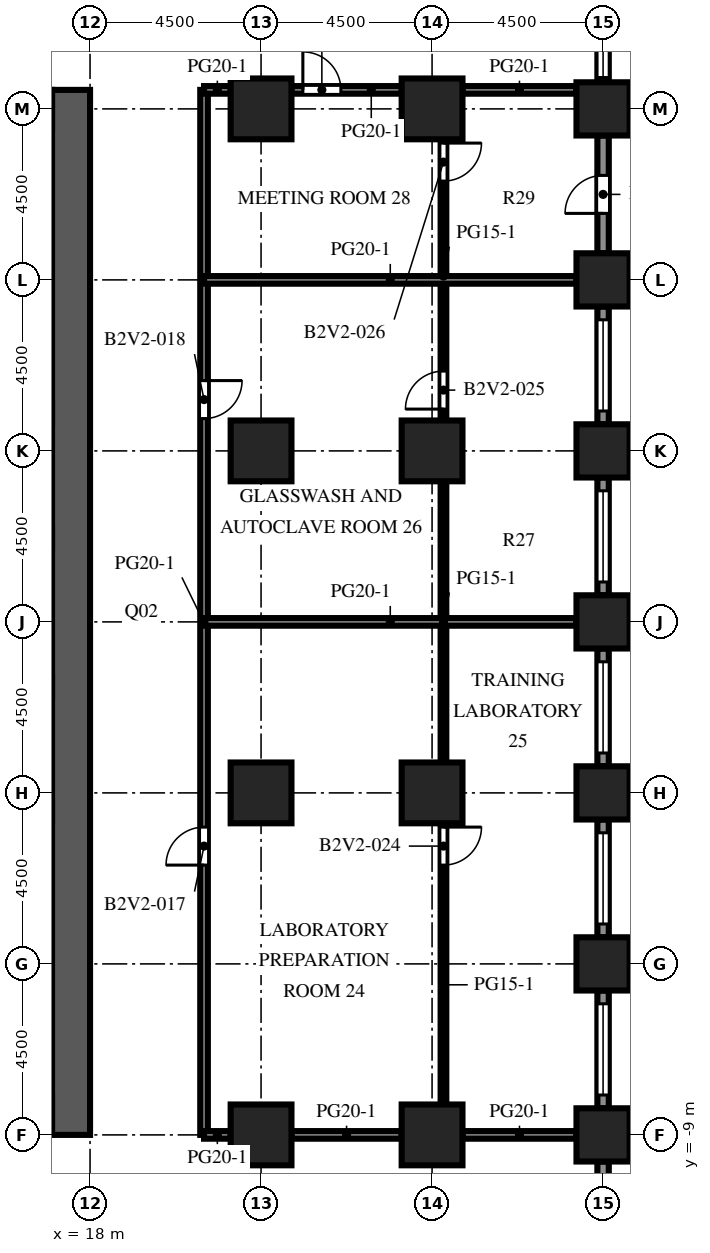
"""IFC4 building model, lengths in metres.
Left out: names, types, materials, properties, quantities, classifications, styles, units other than length and angle.
Written with IfcOpenShell. Run it as: python <this file> out.ifc"""

import sys

from ifc_helpers import new_model, si_unit, direction, frame, frame_2d, origin, origin_2d, place, context, subcontext, project, spatial, rectangle, extrude, element, fill, save


model = new_model("IFC4")
c1 = context("Model", 3, precision=1e-05, world=origin(), true_north=direction((0.0, 1.0)))
c2 = subcontext(c1, "Body", "Model", "MODEL_VIEW")
j1 = project(units=[si_unit("LENGTHUNIT", "METRE"), si_unit("PLANEANGLEUNIT", "RADIAN")], contexts=[c1])
p1 = place(None, origin())
s1 = spatial("IfcSite", under=j1, at=p1, CompositionType="ELEMENT")
p2 = place(p1, origin())
s2 = spatial("IfcBuilding", under=s1, at=p2, CompositionType="ELEMENT")
p3 = place(p2, frame((0.0, 0.0, 58.3)))
s3 = spatial("IfcBuildingStorey", under=s2, at=p3, CompositionType="ELEMENT", Elevation=58.3)
for number, where, z_axis, x_axis in (
    (1, (31.5, -9.0, 0.0), (0.0, 0.0, 1.0), (1.0, 0.0, 0.0)),
    (2, (31.5, -4.5, 0.0), (0.0, 0.0, 1.0), (1.0, 0.0, 0.0)),
    (3, (31.5, 0.0, 0.0), (0.0, 0.0, 1.0), (1.0, 0.0, 0.0)),
    (4, (31.5, 4.5, 0.0), (0.0, 0.0, 1.0), (1.0, 0.0, 0.0)),
    (5, (31.5, 9.0, 0.0), (0.0, 0.0, 1.0), (1.0, 0.0, 0.0)),
    (6, (31.5, 13.5, 0.0), (0.0, 0.0, 1.0), (1.0, 0.0, 0.0)),
    (7, (31.5, 18.0, 0.0), (0.0, 0.0, 1.0), (1.0, 0.0, 0.0)),
):
    element("IfcColumn", number, at=place(p3, frame(where, z_axis=z_axis, x_axis=x_axis)), inside=s3, PredefinedType="COLUMN", context=c2, shape_type="SweptSolid", body=[
        extrude(rectangle(XDim=1.4, YDim=1.4, at=origin_2d()), origin(), (0.0, 0.0, 1.0), 4.1),
    ])
for number, where, z_axis, x_axis in (
    (8, (22.5, -9.0, 0.0), (0.0, 0.0, 1.0), (1.0, 0.0, 0.0)),
    (9, (22.5, 0.0, 0.0), (0.0, 0.0, 1.0), (1.0, 0.0, 0.0)),
    (10, (22.5, 9.0, 0.0), (0.0, 0.0, 1.0), (1.0, 0.0, 0.0)),
    (11, (22.5, 18.0, 0.0), (0.0, 0.0, 1.0), (1.0, 0.0, 0.0)),
    (12, (27.0, -9.0, 0.0), (0.0, 0.0, 1.0), (1.0, 0.0, 0.0)),
    (13, (27.0, 0.0, 0.0), (0.0, 0.0, 1.0), (1.0, 0.0, 0.0)),
    (14, (27.0, 9.0, 0.0), (0.0, 0.0, 1.0), (1.0, 0.0, 0.0)),
    (15, (27.0, 18.0, 0.0), (0.0, 0.0, 1.0), (1.0, 0.0, 0.0)),
):
    element("IfcColumn", number, at=place(p3, frame(where, z_axis=z_axis, x_axis=x_axis)), inside=s3, PredefinedType="COLUMN", context=c2, shape_type="SweptSolid", body=[
        extrude(rectangle(XDim=1.6, YDim=1.6, at=origin_2d()), origin(), (0.0, 0.0, 1.0), 4.1),
    ])
p4 = place(p3, frame((17.5, -9.0, 0.0), z_axis=(0.0, 0.0, 1.0), x_axis=(0.0, 1.0, 0.0)))
e16 = element("IfcWall", 16, at=p4, inside=s3, PredefinedType="SHEAR", context=c2, shape_type="SweptSolid", body=[
    extrude(rectangle(XDim=27.5, YDim=1.0, at=frame_2d((13.75, 0.0))), origin(), (0.0, 0.0, 1.0), 4.1),
])
p5 = place(p4, frame((12.55, 0.0, 0.0)))
e17 = element("IfcOpeningElement", 17, at=p5, cuts=e16, PredefinedType="OPENING", context=c2, shape_type="SweptSolid", body=[
    extrude(rectangle(XDim=2.4, YDim=2.4, at=frame_2d((1.2, 1.2))), frame((0.0, 0.51, 0.0), z_axis=(0.0, -1.0, 0.0), x_axis=(1.0, 0.0, 0.0)), (0.0, 0.0, 1.0), 1.02),
])
p6 = place(p4, frame((6.825, 0.0, 0.0)))
e18 = element("IfcOpeningElement", 18, at=p6, cuts=e16, PredefinedType="OPENING", context=c2, shape_type="SweptSolid", body=[
    extrude(rectangle(XDim=1.2, YDim=2.1, at=frame_2d((0.6, 1.05))), frame((0.0, 0.51, 0.0), z_axis=(0.0, -1.0, 0.0), x_axis=(1.0, 0.0, 0.0)), (0.0, 0.0, 1.0), 1.02),
])
p7 = place(p4, frame((19.475, 0.0, 0.0)))
e19 = element("IfcOpeningElement", 19, at=p7, cuts=e16, PredefinedType="OPENING", context=c2, shape_type="SweptSolid", body=[
    extrude(rectangle(XDim=1.2, YDim=2.1, at=frame_2d((0.6, 1.05))), frame((0.0, 0.51, 0.0), z_axis=(0.0, -1.0, 0.0), x_axis=(1.0, 0.0, 0.0)), (0.0, 0.0, 1.0), 1.02),
])
p8 = place(p3, frame((31.5, -9.7, 0.0), z_axis=(0.0, 0.0, 1.0), x_axis=(0.0, -1.0, 0.0)))
e20 = element("IfcWall", 20, at=p8, inside=s3, PredefinedType="SOLIDWALL", context=c2, shape_type="SweptSolid", body=[
    extrude(rectangle(XDim=3.1, YDim=0.3, at=frame_2d((1.55, 0.0))), origin(), (0.0, 0.0, 1.0), 2.75),
])
p9 = place(p8, frame((0.475, 0.0, 0.8)))
e21 = element("IfcOpeningElement", 21, at=p9, cuts=e20, PredefinedType="OPENING", context=c2, shape_type="SweptSolid", body=[
    extrude(rectangle(XDim=1.2, YDim=1.7, at=frame_2d((0.6, 0.85))), frame((0.0, 0.16, 0.0), z_axis=(0.0, -1.0, 0.0), x_axis=(1.0, 0.0, 0.0)), (0.0, 0.0, 1.0), 0.32),
])
p10 = place(p3, frame((31.5, -5.2, 0.0), z_axis=(0.0, 0.0, 1.0), x_axis=(0.0, -1.0, 0.0)))
e22 = element("IfcWall", 22, at=p10, inside=s3, PredefinedType="SOLIDWALL", context=c2, shape_type="SweptSolid", body=[
    extrude(rectangle(XDim=3.1, YDim=0.3, at=frame_2d((1.55, 0.0))), origin(), (0.0, 0.0, 1.0), 2.75),
])
p11 = place(p10, frame((0.35, 0.0, 0.8)))
e23 = element("IfcOpeningElement", 23, at=p11, cuts=e22, PredefinedType="OPENING", context=c2, shape_type="SweptSolid", body=[
    extrude(rectangle(XDim=2.4, YDim=1.7, at=frame_2d((1.2, 0.85))), frame((0.0, 0.16, 0.0), z_axis=(0.0, -1.0, 0.0), x_axis=(1.0, 0.0, 0.0)), (0.0, 0.0, 1.0), 0.32),
])
p12 = place(p3, frame((31.5, -0.7, 0.0), z_axis=(0.0, 0.0, 1.0), x_axis=(0.0, -1.0, 0.0)))
e24 = element("IfcWall", 24, at=p12, inside=s3, PredefinedType="SOLIDWALL", context=c2, shape_type="SweptSolid", body=[
    extrude(rectangle(XDim=3.1, YDim=0.3, at=frame_2d((1.55, 0.0))), origin(), (0.0, 0.0, 1.0), 2.75),
])
p13 = place(p12, frame((0.35, 0.0, 0.8)))
e25 = element("IfcOpeningElement", 25, at=p13, cuts=e24, PredefinedType="OPENING", context=c2, shape_type="SweptSolid", body=[
    extrude(rectangle(XDim=2.4, YDim=1.7, at=frame_2d((1.2, 0.85))), frame((0.0, 0.16, 0.0), z_axis=(0.0, -1.0, 0.0), x_axis=(1.0, 0.0, 0.0)), (0.0, 0.0, 1.0), 0.32),
])
p14 = place(p3, frame((31.5, 3.8, 0.0), z_axis=(0.0, 0.0, 1.0), x_axis=(0.0, -1.0, 0.0)))
e26 = element("IfcWall", 26, at=p14, inside=s3, PredefinedType="SOLIDWALL", context=c2, shape_type="SweptSolid", body=[
    extrude(rectangle(XDim=3.1, YDim=0.3, at=frame_2d((1.55, 0.0))), origin(), (0.0, 0.0, 1.0), 2.75),
])
p15 = place(p14, frame((0.35, 0.0, 0.8)))
e27 = element("IfcOpeningElement", 27, at=p15, cuts=e26, PredefinedType="OPENING", context=c2, shape_type="SweptSolid", body=[
    extrude(rectangle(XDim=2.4, YDim=1.7, at=frame_2d((1.2, 0.85))), frame((0.0, 0.16, 0.0), z_axis=(0.0, -1.0, 0.0), x_axis=(1.0, 0.0, 0.0)), (0.0, 0.0, 1.0), 0.32),
])
p16 = place(p3, frame((31.5, 8.3, 0.0), z_axis=(0.0, 0.0, 1.0), x_axis=(0.0, -1.0, 0.0)))
e28 = element("IfcWall", 28, at=p16, inside=s3, PredefinedType="SOLIDWALL", context=c2, shape_type="SweptSolid", body=[
    extrude(rectangle(XDim=3.1, YDim=0.3, at=frame_2d((1.55, 0.0))), origin(), (0.0, 0.0, 1.0), 2.75),
])
p17 = place(p16, frame((0.35, 0.0, 0.8)))
e29 = element("IfcOpeningElement", 29, at=p17, cuts=e28, PredefinedType="OPENING", context=c2, shape_type="SweptSolid", body=[
    extrude(rectangle(XDim=2.4, YDim=1.7, at=frame_2d((1.2, 0.85))), frame((0.0, 0.16, 0.0), z_axis=(0.0, -1.0, 0.0), x_axis=(1.0, 0.0, 0.0)), (0.0, 0.0, 1.0), 0.32),
])
p18 = place(p3, frame((31.5, 12.8, 0.0), z_axis=(0.0, 0.0, 1.0), x_axis=(0.0, -1.0, 0.0)))
e30 = element("IfcWall", 30, at=p18, inside=s3, PredefinedType="SOLIDWALL", context=c2, shape_type="SweptSolid", body=[
    extrude(rectangle(XDim=3.1, YDim=0.3, at=frame_2d((1.55, 0.0))), origin(), (0.0, 0.0, 1.0), 2.75),
])
p19 = place(p18, frame((0.35, 0.0, 0.8)))
e31 = element("IfcOpeningElement", 31, at=p19, cuts=e30, PredefinedType="OPENING", context=c2, shape_type="SweptSolid", body=[
    extrude(rectangle(XDim=2.4, YDim=1.7, at=frame_2d((1.2, 0.85))), frame((0.0, 0.16, 0.0), z_axis=(0.0, -1.0, 0.0), x_axis=(1.0, 0.0, 0.0)), (0.0, 0.0, 1.0), 0.32),
])
p20 = place(p3, frame((31.5, 17.3, 0.0), z_axis=(0.0, 0.0, 1.0), x_axis=(0.0, -1.0, 0.0)))
e32 = element("IfcWall", 32, at=p20, inside=s3, PredefinedType="SOLIDWALL", context=c2, shape_type="SweptSolid", body=[
    extrude(rectangle(XDim=3.1, YDim=0.3, at=frame_2d((1.55, 0.0))), origin(), (0.0, 0.0, 1.0), 2.75),
])
p21 = place(p20, frame((1.05, 0.0, 0.0)))
e33 = element("IfcOpeningElement", 33, at=p21, cuts=e32, PredefinedType="OPENING", context=c2, shape_type="SweptSolid", body=[
    extrude(rectangle(XDim=1.0, YDim=2.2, at=frame_2d((0.5, 1.1))), frame((0.0, 0.16, 0.0), z_axis=(0.0, -1.0, 0.0), x_axis=(1.0, 0.0, 0.0)), (0.0, 0.0, 1.0), 0.32),
])
p22 = place(p3, frame((31.5, 21.8, 0.0), z_axis=(0.0, 0.0, 1.0), x_axis=(0.0, -1.0, 0.0)))
e34 = element("IfcWall", 34, at=p22, inside=s3, PredefinedType="SOLIDWALL", context=c2, shape_type="SweptSolid", body=[
    extrude(rectangle(XDim=3.1, YDim=0.3, at=frame_2d((1.55, 0.0))), origin(), (0.0, 0.0, 1.0), 2.75),
])
p23 = place(p22, frame((0.575, 0.0, 0.8)))
e35 = element("IfcOpeningElement", 35, at=p23, cuts=e34, PredefinedType="OPENING", context=c2, shape_type="SweptSolid", body=[
    extrude(rectangle(XDim=2.4, YDim=1.7, at=frame_2d((1.2, 0.85))), frame((0.0, 0.16, 0.0), z_axis=(0.0, -1.0, 0.0), x_axis=(1.0, 0.0, 0.0)), (0.0, 0.0, 1.0), 0.32),
])
p24 = place(p3, frame((21.0, 18.5, 0.0), z_axis=(0.0, 0.0, 1.0), x_axis=(0.0, -1.0, 0.0)))
e36 = element("IfcWall", 36, at=p24, inside=s3, PredefinedType="PARTITIONING", context=c2, shape_type="SweptSolid", body=[
    extrude(rectangle(XDim=27.5, YDim=0.2, at=frame_2d((13.75, 0.0))), origin(), (0.0, 0.0, 1.0), 3.65),
])
p25 = place(p24, frame((19.4, 0.0, 0.0)))
e37 = element("IfcOpeningElement", 37, at=p25, cuts=e36, PredefinedType="OPENING", context=c2, shape_type="SweptSolid", body=[
    extrude(rectangle(XDim=1.0, YDim=2.1, at=frame_2d((0.5, 1.05))), frame((0.0, 0.11, 0.0), z_axis=(0.0, -1.0, 0.0), x_axis=(1.0, 0.0, 0.0)), (0.0, 0.0, 1.0), 0.22),
])
p26 = place(p24, frame((7.65, 0.0, 0.0)))
e38 = element("IfcOpeningElement", 38, at=p26, cuts=e36, PredefinedType="OPENING", context=c2, shape_type="SweptSolid", body=[
    extrude(rectangle(XDim=1.0, YDim=2.1, at=frame_2d((0.5, 1.05))), frame((0.0, 0.11, 0.0), z_axis=(0.0, -1.0, 0.0), x_axis=(1.0, 0.0, 0.0)), (0.0, 0.0, 1.0), 0.22),
])
p27 = place(p3, frame((27.3, -0.8, 0.0), z_axis=(0.0, 0.0, 1.0), x_axis=(0.0, -1.0, 0.0)))
e39 = element("IfcWall", 39, at=p27, inside=s3, PredefinedType="PARTITIONING", context=c2, shape_type="SweptSolid", body=[
    extrude(rectangle(XDim=7.4, YDim=0.15, at=frame_2d((3.7, 0.0))), origin(), (0.0, 0.0, 1.0), 3.65),
])
p28 = place(p27, frame((0.1, 0.0, 0.0)))
e40 = element("IfcOpeningElement", 40, at=p28, cuts=e39, PredefinedType="OPENING", context=c2, shape_type="SweptSolid", body=[
    extrude(rectangle(XDim=1.0, YDim=2.1, at=frame_2d((0.5, 1.05))), frame((0.0, 0.085, 0.0), z_axis=(0.0, -1.0, 0.0), x_axis=(1.0, 0.0, 0.0)), (0.0, 0.0, 1.0), 0.17),
])
p29 = place(p3, frame((27.3, 0.8, 0.0), z_axis=(0.0, 0.0, 1.0), x_axis=(0.0, 1.0, 0.0)))
e41 = element("IfcWall", 41, at=p29, inside=s3, PredefinedType="PARTITIONING", context=c2, shape_type="SweptSolid", body=[
    extrude(rectangle(XDim=7.4, YDim=0.15, at=frame_2d((3.7, 0.0))), origin(), (0.0, 0.0, 1.0), 3.65),
])
p30 = place(p3, frame((27.3, 17.2, 0.0), z_axis=(0.0, 0.0, 1.0), x_axis=(0.0, -1.0, 0.0)))
e42 = element("IfcWall", 42, at=p30, inside=s3, PredefinedType="PARTITIONING", context=c2, shape_type="SweptSolid", body=[
    extrude(rectangle(XDim=7.4, YDim=0.15, at=frame_2d((3.7, 0.0))), origin(), (0.0, 0.0, 1.0), 3.65),
])
p31 = place(p30, frame((6.1, 0.0, 0.0)))
e43 = element("IfcOpeningElement", 43, at=p31, cuts=e42, PredefinedType="OPENING", context=c2, shape_type="SweptSolid", body=[
    extrude(rectangle(XDim=1.0, YDim=2.1, at=frame_2d((0.5, 1.05))), frame((0.0, 0.085, 0.0), z_axis=(0.0, -1.0, 0.0), x_axis=(1.0, 0.0, 0.0)), (0.0, 0.0, 1.0), 0.17),
])
p32 = place(p30, frame((0.1, 0.0, 0.0)))
e44 = element("IfcOpeningElement", 44, at=p32, cuts=e42, PredefinedType="OPENING", context=c2, shape_type="SweptSolid", body=[
    extrude(rectangle(XDim=1.0, YDim=2.1, at=frame_2d((0.5, 1.05))), frame((0.0, 0.085, 0.0), z_axis=(0.0, -1.0, 0.0), x_axis=(1.0, 0.0, 0.0)), (0.0, 0.0, 1.0), 0.17),
])
p33 = place(p3, frame((21.0, -9.0, 0.0), z_axis=(0.0, 0.0, 1.0), x_axis=(1.0, 0.0, 0.0)))
e45 = element("IfcWall", 45, at=p33, inside=s3, PredefinedType="PARTITIONING", context=c2, shape_type="SweptSolid", body=[
    extrude(rectangle(XDim=0.7, YDim=0.2, at=frame_2d((0.35, 0.0))), origin(), (0.0, 0.0, 1.0), 3.65),
])
p34 = place(p3, frame((23.3, -9.0, 0.0), z_axis=(0.0, 0.0, 1.0), x_axis=(1.0, 0.0, 0.0)))
e46 = element("IfcWall", 46, at=p34, inside=s3, PredefinedType="PARTITIONING", context=c2, shape_type="SweptSolid", body=[
    extrude(rectangle(XDim=2.9, YDim=0.2, at=frame_2d((1.45, 0.0))), origin(), (0.0, 0.0, 1.0), 3.65),
])
p35 = place(p3, frame((27.8, -9.0, 0.0), z_axis=(0.0, 0.0, 1.0), x_axis=(1.0, 0.0, 0.0)))
e47 = element("IfcWall", 47, at=p35, inside=s3, PredefinedType="PARTITIONING", context=c2, shape_type="SweptSolid", body=[
    extrude(rectangle(XDim=3.0, YDim=0.2, at=frame_2d((1.5, 0.0))), origin(), (0.0, 0.0, 1.0), 3.65),
])
for number, where, z_axis, x_axis in (
    (48, (21.0, 4.5, 0.0), (0.0, 0.0, 1.0), (1.0, 0.0, 0.0)),
    (49, (21.0, 13.5, 0.0), (0.0, 0.0, 1.0), (1.0, 0.0, 0.0)),
):
    element("IfcWall", number, at=place(p3, frame(where, z_axis=z_axis, x_axis=x_axis)), inside=s3, PredefinedType="PARTITIONING", context=c2, shape_type="SweptSolid", body=[
        extrude(rectangle(XDim=9.8, YDim=0.2, at=frame_2d((4.9, 0.0))), origin(), (0.0, 0.0, 1.0), 3.65),
    ])
p36 = place(p3, frame((21.0, 18.5, 0.0), z_axis=(0.0, 0.0, 1.0), x_axis=(1.0, 0.0, 0.0)))
e50 = element("IfcWall", 50, at=p36, inside=s3, PredefinedType="PARTITIONING", context=c2, shape_type="SweptSolid", body=[
    extrude(rectangle(XDim=0.7, YDim=0.2, at=frame_2d((0.35, 0.0))), origin(), (0.0, 0.0, 1.0), 3.65),
])
p37 = place(p3, frame((26.2, 18.5, 0.0), z_axis=(0.0, 0.0, 1.0), x_axis=(-1.0, 0.0, 0.0)))
e51 = element("IfcWall", 51, at=p37, inside=s3, PredefinedType="PARTITIONING", context=c2, shape_type="SweptSolid", body=[
    extrude(rectangle(XDim=2.9, YDim=0.2, at=frame_2d((1.45, 0.0))), origin(), (0.0, 0.0, 1.0), 3.65),
])
p38 = place(p37, frame((1.6, 0.0, 0.0)))
e52 = element("IfcOpeningElement", 52, at=p38, cuts=e51, PredefinedType="OPENING", context=c2, shape_type="SweptSolid", body=[
    extrude(rectangle(XDim=1.0, YDim=2.1, at=frame_2d((0.5, 1.05))), frame((0.0, 0.11, 0.0), z_axis=(0.0, -1.0, 0.0), x_axis=(1.0, 0.0, 0.0)), (0.0, 0.0, 1.0), 0.22),
])
p39 = place(p3, frame((27.8, 18.5, 0.0), z_axis=(0.0, 0.0, 1.0), x_axis=(1.0, 0.0, 0.0)))
e53 = element("IfcWall", 53, at=p39, inside=s3, PredefinedType="PARTITIONING", context=c2, shape_type="SweptSolid", body=[
    extrude(rectangle(XDim=3.0, YDim=0.2, at=frame_2d((1.5, 0.0))), origin(), (0.0, 0.0, 1.0), 3.65),
])
p40 = place(p11, origin())
e54 = element("IfcWindow", 54, at=p40, inside=s3, PartitioningType="SINGLE_PANEL", PredefinedType="WINDOW", context=c2, shape_type="SweptSolid", body=[
    extrude(rectangle(XDim=2.4, YDim=1.7, at=frame_2d((1.2, 0.85))), frame((0.0, 0.03, 0.0), z_axis=(0.0, -1.0, 0.0), x_axis=(1.0, 0.0, 0.0)), (0.0, 0.0, 1.0), 0.06),
])
fill(e23, e54)
p41 = place(p13, origin())
e55 = element("IfcWindow", 55, at=p41, inside=s3, PartitioningType="SINGLE_PANEL", PredefinedType="WINDOW", context=c2, shape_type="SweptSolid", body=[
    extrude(rectangle(XDim=2.4, YDim=1.7, at=frame_2d((1.2, 0.85))), frame((0.0, 0.03, 0.0), z_axis=(0.0, -1.0, 0.0), x_axis=(1.0, 0.0, 0.0)), (0.0, 0.0, 1.0), 0.06),
])
fill(e25, e55)
p42 = place(p15, origin())
e56 = element("IfcWindow", 56, at=p42, inside=s3, PartitioningType="SINGLE_PANEL", PredefinedType="WINDOW", context=c2, shape_type="SweptSolid", body=[
    extrude(rectangle(XDim=2.4, YDim=1.7, at=frame_2d((1.2, 0.85))), frame((0.0, 0.03, 0.0), z_axis=(0.0, -1.0, 0.0), x_axis=(1.0, 0.0, 0.0)), (0.0, 0.0, 1.0), 0.06),
])
fill(e27, e56)
p43 = place(p17, origin())
e57 = element("IfcWindow", 57, at=p43, inside=s3, PartitioningType="SINGLE_PANEL", PredefinedType="WINDOW", context=c2, shape_type="SweptSolid", body=[
    extrude(rectangle(XDim=2.4, YDim=1.7, at=frame_2d((1.2, 0.85))), frame((0.0, 0.03, 0.0), z_axis=(0.0, -1.0, 0.0), x_axis=(1.0, 0.0, 0.0)), (0.0, 0.0, 1.0), 0.06),
])
fill(e29, e57)
p44 = place(p19, origin())
e58 = element("IfcWindow", 58, at=p44, inside=s3, PartitioningType="SINGLE_PANEL", PredefinedType="WINDOW", context=c2, shape_type="SweptSolid", body=[
    extrude(rectangle(XDim=2.4, YDim=1.7, at=frame_2d((1.2, 0.85))), frame((0.0, 0.03, 0.0), z_axis=(0.0, -1.0, 0.0), x_axis=(1.0, 0.0, 0.0)), (0.0, 0.0, 1.0), 0.06),
])
fill(e31, e58)
p45 = place(p21, origin())
e59 = element("IfcDoor", 59, at=p45, inside=s3, OperationType="SINGLE_SWING_RIGHT", PredefinedType="DOOR", context=c2, shape_type="SweptSolid", body=[
    extrude(rectangle(XDim=1.0, YDim=2.2, at=frame_2d((0.5, 1.1))), frame((0.0, 0.025, 0.0), z_axis=(0.0, -1.0, 0.0), x_axis=(1.0, 0.0, 0.0)), (0.0, 0.0, 1.0), 0.05),
])
fill(e33, e59)
p46 = place(p23, origin())
e60 = element("IfcWindow", 60, at=p46, inside=s3, PartitioningType="SINGLE_PANEL", PredefinedType="WINDOW", context=c2, shape_type="SweptSolid", body=[
    extrude(rectangle(XDim=2.4, YDim=1.7, at=frame_2d((1.2, 0.85))), frame((0.0, 0.03, 0.0), z_axis=(0.0, -1.0, 0.0), x_axis=(1.0, 0.0, 0.0)), (0.0, 0.0, 1.0), 0.06),
])
fill(e35, e60)
p47 = place(p5, origin())
e61 = element("IfcDoor", 61, at=p47, inside=s3, OperationType="DOUBLE_DOOR_DOUBLE_SWING", PredefinedType="DOOR", context=c2, shape_type="SweptSolid", body=[
    extrude(rectangle(XDim=2.4, YDim=2.4, at=frame_2d((1.2, 1.2))), frame((0.0, 0.025, 0.0), z_axis=(0.0, -1.0, 0.0), x_axis=(1.0, 0.0, 0.0)), (0.0, 0.0, 1.0), 0.05),
])
fill(e17, e61)
p48 = place(p6, frame((1.2, 0.0, 0.0), z_axis=(0.0, 0.0, 1.0), x_axis=(-1.0, 0.0, 0.0)))
e62 = element("IfcDoor", 62, at=p48, inside=s3, OperationType="SINGLE_SWING_LEFT", PredefinedType="DOOR", context=c2, shape_type="SweptSolid", body=[
    extrude(rectangle(XDim=1.2, YDim=2.1, at=frame_2d((0.6, 1.05))), frame((0.0, 0.025, 0.0), z_axis=(0.0, -1.0, 0.0), x_axis=(1.0, 0.0, 0.0)), (0.0, 0.0, 1.0), 0.05),
])
fill(e18, e62)
p49 = place(p7, frame((1.2, 0.0, 0.0), z_axis=(0.0, 0.0, 1.0), x_axis=(-1.0, 0.0, 0.0)))
e63 = element("IfcDoor", 63, at=p49, inside=s3, OperationType="SINGLE_SWING_LEFT", PredefinedType="DOOR", context=c2, shape_type="SweptSolid", body=[
    extrude(rectangle(XDim=1.2, YDim=2.1, at=frame_2d((0.6, 1.05))), frame((0.0, 0.025, 0.0), z_axis=(0.0, -1.0, 0.0), x_axis=(1.0, 0.0, 0.0)), (0.0, 0.0, 1.0), 0.05),
])
fill(e19, e63)
p50 = place(p38, origin())
e64 = element("IfcDoor", 64, at=p50, inside=s3, OperationType="SINGLE_SWING_RIGHT", PredefinedType="DOOR", context=c2, shape_type="SweptSolid", body=[
    extrude(rectangle(XDim=1.0, YDim=2.1, at=frame_2d((0.5, 1.05))), frame((0.0, 0.025, 0.0), z_axis=(0.0, -1.0, 0.0), x_axis=(1.0, 0.0, 0.0)), (0.0, 0.0, 1.0), 0.05),
])
fill(e52, e64)
p51 = place(p25, origin())
e65 = element("IfcDoor", 65, at=p51, inside=s3, OperationType="SINGLE_SWING_RIGHT", PredefinedType="DOOR", context=c2, shape_type="SweptSolid", body=[
    extrude(rectangle(XDim=1.0, YDim=2.1, at=frame_2d((0.5, 1.05))), frame((0.0, 0.025, 0.0), z_axis=(0.0, -1.0, 0.0), x_axis=(1.0, 0.0, 0.0)), (0.0, 0.0, 1.0), 0.05),
])
fill(e37, e65)
p52 = place(p26, origin())
e66 = element("IfcDoor", 66, at=p52, inside=s3, OperationType="SINGLE_SWING_LEFT", PredefinedType="DOOR", context=c2, shape_type="SweptSolid", body=[
    extrude(rectangle(XDim=1.0, YDim=2.1, at=frame_2d((0.5, 1.05))), frame((0.0, 0.025, 0.0), z_axis=(0.0, -1.0, 0.0), x_axis=(1.0, 0.0, 0.0)), (0.0, 0.0, 1.0), 0.05),
])
fill(e38, e66)
p53 = place(p28, origin())
e67 = element("IfcDoor", 67, at=p53, inside=s3, OperationType="SINGLE_SWING_LEFT", PredefinedType="DOOR", context=c2, shape_type="SweptSolid", body=[
    extrude(rectangle(XDim=1.0, YDim=2.1, at=frame_2d((0.5, 1.05))), frame((0.0, 0.025, 0.0), z_axis=(0.0, -1.0, 0.0), x_axis=(1.0, 0.0, 0.0)), (0.0, 0.0, 1.0), 0.05),
])
fill(e40, e67)
p54 = place(p31, origin())
e68 = element("IfcDoor", 68, at=p54, inside=s3, OperationType="SINGLE_SWING_RIGHT", PredefinedType="DOOR", context=c2, shape_type="SweptSolid", body=[
    extrude(rectangle(XDim=1.0, YDim=2.1, at=frame_2d((0.5, 1.05))), frame((0.0, 0.025, 0.0), z_axis=(0.0, -1.0, 0.0), x_axis=(1.0, 0.0, 0.0)), (0.0, 0.0, 1.0), 0.05),
])
fill(e43, e68)
p55 = place(p32, origin())
e69 = element("IfcDoor", 69, at=p55, inside=s3, OperationType="SINGLE_SWING_LEFT", PredefinedType="DOOR", context=c2, shape_type="SweptSolid", body=[
    extrude(rectangle(XDim=1.0, YDim=2.1, at=frame_2d((0.5, 1.05))), frame((0.0, 0.025, 0.0), z_axis=(0.0, -1.0, 0.0), x_axis=(1.0, 0.0, 0.0)), (0.0, 0.0, 1.0), 0.05),
])
fill(e44, e69)
save(model, sys.argv[1])
